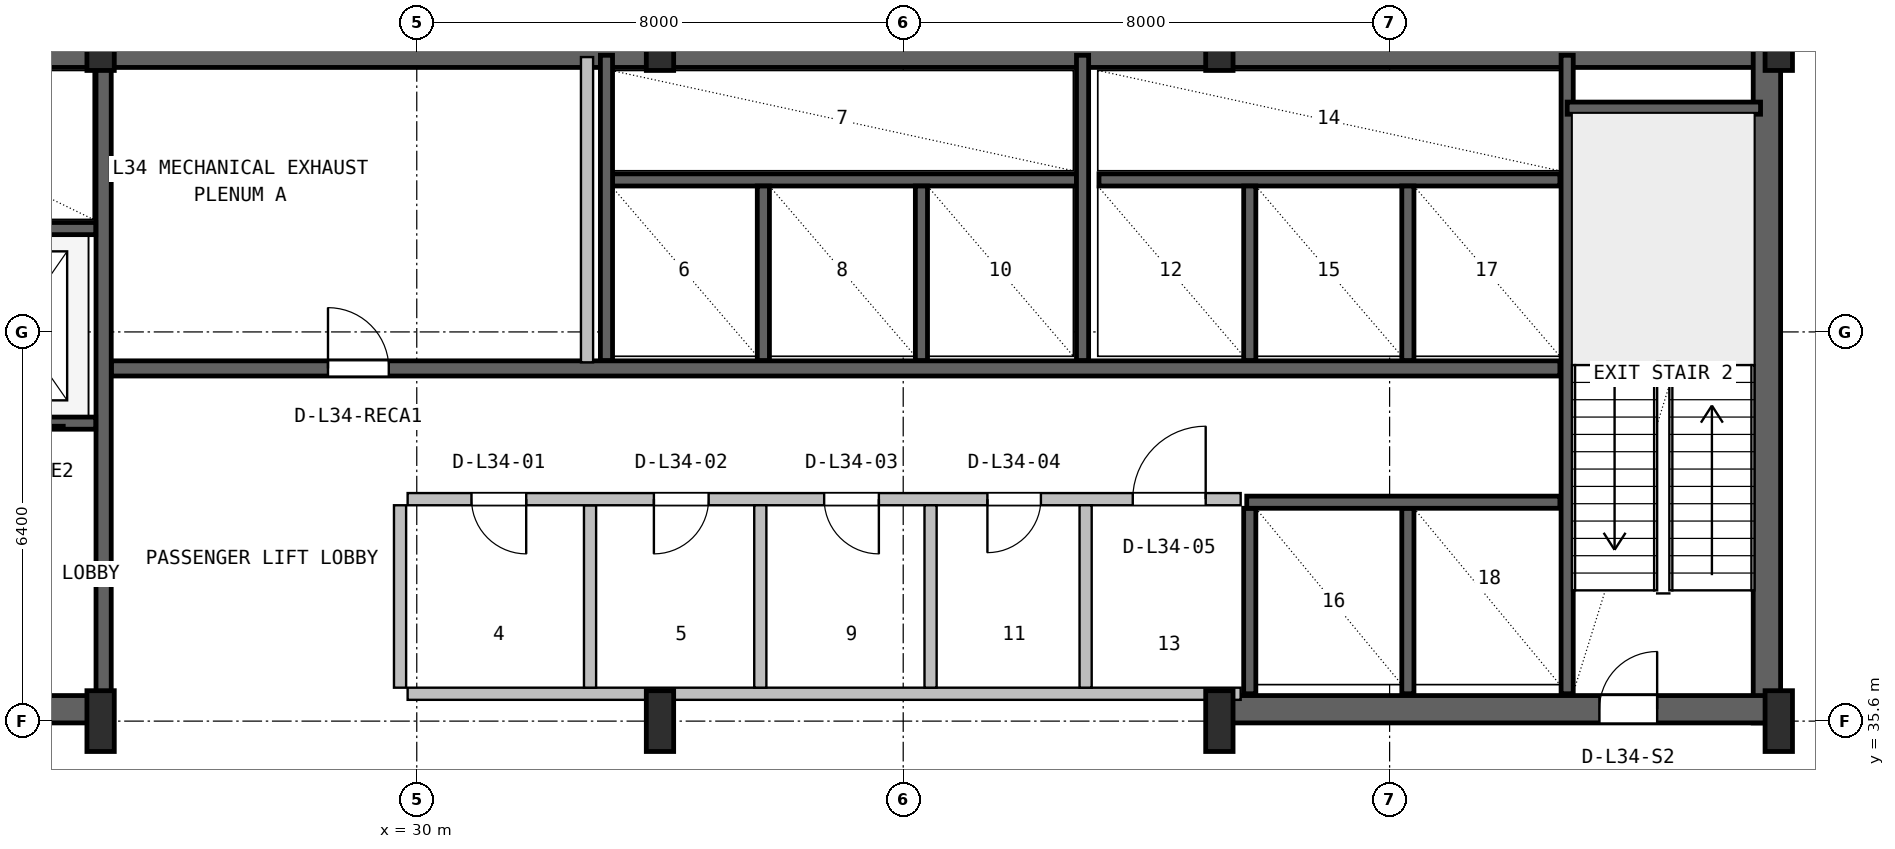
"""IFC4 building model, lengths in metres.
Left out: names, types, materials, properties, quantities, classifications, styles, units other than length and angle.
Written with IfcOpenShell. Run it as: python <this file> out.ifc"""

import sys

from ifc_helpers import new_model, si_unit, direction, frame, frame_2d, origin, origin_2d, place, context, subcontext, project, spatial, rectangle, i_section, extrude, source, transform, mapped, element, fill, save


model = new_model("IFC4")
c1 = context("Model", 3, precision=1e-05, world=origin(), true_north=direction((0.0, 1.0)))
c2 = subcontext(c1, "Body", "Model", "MODEL_VIEW")
j1 = project(units=[si_unit("LENGTHUNIT", "METRE"), si_unit("PLANEANGLEUNIT", "RADIAN")], contexts=[c1])
p1 = place(None, origin())
s1 = spatial("IfcSite", under=j1, at=p1, CompositionType="ELEMENT")
p2 = place(p1, origin())
s2 = spatial("IfcBuilding", under=s1, at=p2, CompositionType="ELEMENT")
p3 = place(p2, frame((0.0, 0.0, 141.0)))
s3 = spatial("IfcBuildingStorey", under=s2, at=p3, CompositionType="ELEMENT", Elevation=141.0)
p4 = place(p3, frame((15.6, 46.575, 0.0), z_axis=(0.0, 0.0, 1.0), x_axis=(1.0, 0.0, 0.0)))
e1 = element("IfcWall", 1, at=p4, inside=s3, PredefinedType="SHEAR", context=c2, shape_type="SweptSolid", body=[
    extrude(rectangle(XDim=36.8, YDim=0.45, at=frame_2d((18.4, 0.0))), origin(), (0.0, 0.0, 1.0), 4.55),
])
p5 = place(p3, frame((52.205, 35.57, 0.0), z_axis=(0.0, 0.0, 1.0), x_axis=(0.0, 1.0, 0.0)))
e2 = element("IfcWall", 2, at=p5, inside=s3, PredefinedType="SHEAR", context=c2, shape_type="SweptSolid", body=[
    extrude(rectangle(XDim=11.23, YDim=0.45, at=frame_2d((5.615, 0.0))), origin(), (0.0, 0.0, 1.0), 4.55),
])
p6 = place(p3, frame((15.57, 35.795, 0.0), z_axis=(0.0, 0.0, 1.0), x_axis=(1.0, 0.0, 0.0)))
e3 = element("IfcWall", 3, at=p6, inside=s3, PredefinedType="SHEAR", context=c2, shape_type="SweptSolid", body=[
    extrude(rectangle(XDim=9.23, YDim=0.45, at=frame_2d((4.615, 0.0))), origin(), (0.0, 0.0, 1.0), 4.55),
])
p7 = place(p6, frame((5.4, 0.0, 0.0)))
e4 = element("IfcOpeningElement", 4, at=p7, cuts=e3, PredefinedType="OPENING", context=c2, shape_type="SweptSolid", body=[
    extrude(rectangle(XDim=1.0, YDim=2.1, at=frame_2d((0.5, 1.05))), frame((0.0, 0.235, 0.0), z_axis=(0.0, -1.0, 0.0), x_axis=(1.0, 0.0, 0.0)), (0.0, 0.0, 1.0), 0.47),
])
p8 = place(p3, frame((43.2, 35.795, 0.0), z_axis=(0.0, 0.0, 1.0), x_axis=(1.0, 0.0, 0.0)))
e5 = element("IfcWall", 5, at=p8, inside=s3, PredefinedType="SHEAR", context=c2, shape_type="SweptSolid", body=[
    extrude(rectangle(XDim=9.23, YDim=0.45, at=frame_2d((4.615, 0.0))), origin(), (0.0, 0.0, 1.0), 4.55),
])
p9 = place(p8, frame((6.25, 0.0, 0.0)))
e6 = element("IfcOpeningElement", 6, at=p9, cuts=e5, PredefinedType="OPENING", context=c2, shape_type="SweptSolid", body=[
    extrude(rectangle(XDim=0.95, YDim=2.1, at=frame_2d((0.475, 1.05))), frame((0.0, 0.235, 0.0), z_axis=(0.0, -1.0, 0.0), x_axis=(1.0, 0.0, 0.0)), (0.0, 0.0, 1.0), 0.47),
])
m1 = source(origin(), c2, "Body", "SweptSolid", [
    extrude(i_section(OverallWidth=0.45, OverallDepth=1.0, WebThickness=0.016, FlangeThickness=0.03, FilletRadius=0.016, at=origin_2d()), origin(), (0.0, 0.0, 1.0), 4.8),
])
for number, where, z_axis, x_axis in (
    (7, (24.8, 35.6, 0.0), (0.0, 0.0, 1.0), (1.0, 0.0, 0.0)),
    (8, (24.8, 46.8, 0.0), (0.0, 0.0, 1.0), (1.0, 0.0, 0.0)),
    (9, (34.0, 35.6, 0.0), (0.0, 0.0, 1.0), (1.0, 0.0, 0.0)),
    (10, (34.0, 46.8, 0.0), (0.0, 0.0, 1.0), (1.0, 0.0, 0.0)),
    (11, (43.2, 35.6, 0.0), (0.0, 0.0, 1.0), (1.0, 0.0, 0.0)),
    (12, (43.2, 46.8, 0.0), (0.0, 0.0, 1.0), (1.0, 0.0, 0.0)),
    (13, (52.4, 35.6, 0.0), (0.0, 0.0, 1.0), (1.0, 0.0, 0.0)),
    (14, (52.4, 46.8, 0.0), (0.0, 0.0, 1.0), (1.0, 0.0, 0.0)),
):
    element("IfcColumn", number, at=place(p3, frame(where, z_axis=z_axis, x_axis=x_axis)), inside=s3, PredefinedType="COLUMN", context=c2, shape_type="MappedRepresentation", body=[
        mapped(m1, transform((0.0, 0.0, 0.0), x_axis=(1.0, 0.0, 0.0), y_axis=(0.0, 1.0, 0.0), z_axis=(0.0, 0.0, 1.0), scale=1.0)),
    ])
p10 = place(p3, frame((24.85, 36.05, 0.0), z_axis=(0.0, 0.0, 1.0), x_axis=(0.0, 1.0, 0.0)))
e15 = element("IfcWall", 15, at=p10, inside=s3, PredefinedType="SHEAR", context=c2, shape_type="SweptSolid", body=[
    extrude(rectangle(XDim=10.45, YDim=0.25, at=frame_2d((5.225, 0.0))), origin(), (0.0, 0.0, 1.0), 4.55),
])
p11 = place(p3, frame((19.2, 40.5, 0.0), z_axis=(0.0, 0.0, 1.0), x_axis=(1.0, 0.0, 0.0)))
e16 = element("IfcWall", 16, at=p11, inside=s3, PredefinedType="SHEAR", context=c2, shape_type="SweptSolid", body=[
    extrude(rectangle(XDim=5.52, YDim=0.2, at=frame_2d((2.76, 0.0))), origin(), (0.0, 0.0, 1.0), 4.55),
])
p12 = place(p11, frame((1.05, 0.0, 0.0)))
e17 = element("IfcOpeningElement", 17, at=p12, cuts=e16, PredefinedType="OPENING", context=c2, shape_type="SweptSolid", body=[
    extrude(rectangle(XDim=1.1, YDim=2.18, at=frame_2d((0.55, 1.09))), frame((0.0, 0.11, 0.0), z_axis=(0.0, -1.0, 0.0), x_axis=(1.0, 0.0, 0.0)), (0.0, 0.0, 1.0), 0.22),
])
p13 = place(p11, frame((3.65, 0.0, 0.0)))
e18 = element("IfcOpeningElement", 18, at=p13, cuts=e16, PredefinedType="OPENING", context=c2, shape_type="SweptSolid", body=[
    extrude(rectangle(XDim=1.1, YDim=2.18, at=frame_2d((0.55, 1.09))), frame((0.0, 0.11, 0.0), z_axis=(0.0, -1.0, 0.0), x_axis=(1.0, 0.0, 0.0)), (0.0, 0.0, 1.0), 0.22),
])
p14 = place(p3, frame((19.2, 43.7, 0.0), z_axis=(0.0, 0.0, 1.0), x_axis=(1.0, 0.0, 0.0)))
e19 = element("IfcWall", 19, at=p14, inside=s3, PredefinedType="SHEAR", context=c2, shape_type="SweptSolid", body=[
    extrude(rectangle(XDim=5.52, YDim=0.2, at=frame_2d((2.76, 0.0))), origin(), (0.0, 0.0, 1.0), 4.55),
])
p15 = place(p3, frame((48.92, 36.05, 0.0), z_axis=(0.0, 0.0, 1.0), x_axis=(0.0, 1.0, 0.0)))
e20 = element("IfcWall", 20, at=p15, inside=s3, PredefinedType="SHEAR", context=c2, shape_type="SweptSolid", body=[
    extrude(rectangle(XDim=10.5, YDim=0.2, at=frame_2d((5.25, 0.0))), origin(), (0.0, 0.0, 1.0), 4.55),
])
p16 = place(p3, frame((48.92, 45.68, 0.0), z_axis=(0.0, 0.0, 1.0), x_axis=(1.0, 0.0, 0.0)))
e21 = element("IfcWall", 21, at=p16, inside=s3, PredefinedType="SHEAR", context=c2, shape_type="SweptSolid", body=[
    extrude(rectangle(XDim=3.18, YDim=0.2, at=frame_2d((1.59, 0.0))), origin(), (0.0, 0.0, 1.0), 4.55),
])
p17 = place(p3, frame((24.98, 41.4, 0.0), z_axis=(0.0, 0.0, 1.0), x_axis=(1.0, 0.0, 0.0)))
e22 = element("IfcWall", 22, at=p17, inside=s3, PredefinedType="SHEAR", context=c2, shape_type="SweptSolid", body=[
    extrude(rectangle(XDim=23.82, YDim=0.25, at=frame_2d((11.91, 0.0))), origin(), (0.0, 0.0, 1.0), 4.55),
])
p18 = place(p17, frame((3.56, 0.0, 0.0)))
e23 = element("IfcOpeningElement", 23, at=p18, cuts=e22, PredefinedType="OPENING", context=c2, shape_type="SweptSolid", body=[
    extrude(rectangle(XDim=1.0, YDim=2.08, at=frame_2d((0.5, 1.04))), frame((0.0, 0.135, 0.0), z_axis=(0.0, -1.0, 0.0), x_axis=(1.0, 0.0, 0.0)), (0.0, 0.0, 1.0), 0.27),
])
p19 = place(p3, frame((33.22, 44.5, 0.0), z_axis=(0.0, 0.0, 1.0), x_axis=(1.0, 0.0, 0.0)))
e24 = element("IfcWall", 24, at=p19, inside=s3, PredefinedType="SHEAR", context=c2, shape_type="SweptSolid", body=[
    extrude(rectangle(XDim=7.63, YDim=0.2, at=frame_2d((3.815, 0.0))), origin(), (0.0, 0.0, 1.0), 4.55),
])
p20 = place(p3, frame((33.12, 41.53, 0.0), z_axis=(0.0, 0.0, 1.0), x_axis=(0.0, 1.0, 0.0)))
e25 = element("IfcWall", 25, at=p20, inside=s3, PredefinedType="SHEAR", context=c2, shape_type="SweptSolid", body=[
    extrude(rectangle(XDim=5.02, YDim=0.2, at=frame_2d((2.51, 0.0))), origin(), (0.0, 0.0, 1.0), 4.55),
])
for number, where, z_axis, x_axis in (
    (26, (35.7, 41.53, 0.0), (0.0, 0.0, 1.0), (0.0, 1.0, 0.0)),
    (27, (38.3, 41.53, 0.0), (0.0, 0.0, 1.0), (0.0, 1.0, 0.0)),
):
    element("IfcWall", number, at=place(p3, frame(where, z_axis=z_axis, x_axis=x_axis)), inside=s3, PredefinedType="SHEAR", context=c2, shape_type="SweptSolid", body=[
        extrude(rectangle(XDim=2.87, YDim=0.2, at=frame_2d((1.435, 0.0))), origin(), (0.0, 0.0, 1.0), 4.55),
    ])
p21 = place(p3, frame((40.95, 41.53, 0.0), z_axis=(0.0, 0.0, 1.0), x_axis=(0.0, 1.0, 0.0)))
e28 = element("IfcWall", 28, at=p21, inside=s3, PredefinedType="SHEAR", context=c2, shape_type="SweptSolid", body=[
    extrude(rectangle(XDim=5.02, YDim=0.2, at=frame_2d((2.51, 0.0))), origin(), (0.0, 0.0, 1.0), 4.55),
])
p22 = place(p3, frame((41.22, 44.5, 0.0), z_axis=(0.0, 0.0, 1.0), x_axis=(1.0, 0.0, 0.0)))
e29 = element("IfcWall", 29, at=p22, inside=s3, PredefinedType="SHEAR", context=c2, shape_type="SweptSolid", body=[
    extrude(rectangle(XDim=7.58, YDim=0.2, at=frame_2d((3.79, 0.0))), origin(), (0.0, 0.0, 1.0), 4.55),
])
for number, where, z_axis, x_axis in (
    (30, (43.7, 41.53, 0.0), (0.0, 0.0, 1.0), (0.0, 1.0, 0.0)),
    (31, (46.3, 41.53, 0.0), (0.0, 0.0, 1.0), (0.0, 1.0, 0.0)),
):
    element("IfcWall", number, at=place(p3, frame(where, z_axis=z_axis, x_axis=x_axis)), inside=s3, PredefinedType="SHEAR", context=c2, shape_type="SweptSolid", body=[
        extrude(rectangle(XDim=2.87, YDim=0.2, at=frame_2d((1.435, 0.0))), origin(), (0.0, 0.0, 1.0), 4.55),
    ])
for number, where, z_axis, x_axis in (
    (32, (43.7, 36.05, 0.0), (0.0, 0.0, 1.0), (0.0, 1.0, 0.0)),
    (33, (46.3, 36.05, 0.0), (0.0, 0.0, 1.0), (0.0, 1.0, 0.0)),
):
    element("IfcWall", number, at=place(p3, frame(where, z_axis=z_axis, x_axis=x_axis)), inside=s3, PredefinedType="SHEAR", context=c2, shape_type="SweptSolid", body=[
        extrude(rectangle(XDim=3.05, YDim=0.2, at=frame_2d((1.525, 0.0))), origin(), (0.0, 0.0, 1.0), 4.55),
    ])
p23 = place(p3, frame((43.65, 39.2, 0.0), z_axis=(0.0, 0.0, 1.0), x_axis=(1.0, 0.0, 0.0)))
e34 = element("IfcWall", 34, at=p23, inside=s3, PredefinedType="SHEAR", context=c2, shape_type="SweptSolid", body=[
    extrude(rectangle(XDim=5.15, YDim=0.2, at=frame_2d((2.575, 0.0))), origin(), (0.0, 0.0, 1.0), 4.55),
])
p24 = place(p3, frame((29.85, 36.05, 0.0), z_axis=(0.0, 0.0, 1.0), x_axis=(1.0, 0.0, 0.0)))
e35 = element("IfcWall", 35, at=p24, inside=s3, PredefinedType="SOLIDWALL", context=c2, shape_type="SweptSolid", body=[
    extrude(rectangle(XDim=13.7, YDim=0.2, at=frame_2d((6.85, 0.0))), origin(), (0.0, 0.0, 1.0), 4.53),
])
p25 = place(p3, frame((32.85, 36.15, 0.0), z_axis=(0.0, 0.0, 1.0), x_axis=(0.0, 1.0, 0.0)))
e36 = element("IfcWall", 36, at=p25, inside=s3, PredefinedType="SOLIDWALL", context=c2, shape_type="SweptSolid", body=[
    extrude(rectangle(XDim=3.0, YDim=0.2, at=frame_2d((1.5, 0.0))), origin(), (0.0, 0.0, 1.0), 4.53),
])
p26 = place(p3, frame((29.85, 39.25, 0.0), z_axis=(0.0, 0.0, 1.0), x_axis=(1.0, 0.0, 0.0)))
e37 = element("IfcWall", 37, at=p26, inside=s3, PredefinedType="SOLIDWALL", context=c2, shape_type="SweptSolid", body=[
    extrude(rectangle(XDim=13.7, YDim=0.2, at=frame_2d((6.85, 0.0))), origin(), (0.0, 0.0, 1.0), 4.53),
])
p27 = place(p26, frame((1.05, 0.0, 0.0)))
e38 = element("IfcOpeningElement", 38, at=p27, cuts=e37, PredefinedType="OPENING", context=c2, shape_type="SweptSolid", body=[
    extrude(rectangle(XDim=0.9, YDim=2.06, at=frame_2d((0.45, 1.03))), frame((0.0, 0.11, 0.0), z_axis=(0.0, -1.0, 0.0), x_axis=(1.0, 0.0, 0.0)), (0.0, 0.0, 1.0), 0.22),
])
p28 = place(p26, frame((4.05, 0.0, 0.0)))
e39 = element("IfcOpeningElement", 39, at=p28, cuts=e37, PredefinedType="OPENING", context=c2, shape_type="SweptSolid", body=[
    extrude(rectangle(XDim=0.9, YDim=2.06, at=frame_2d((0.45, 1.03))), frame((0.0, 0.11, 0.0), z_axis=(0.0, -1.0, 0.0), x_axis=(1.0, 0.0, 0.0)), (0.0, 0.0, 1.0), 0.22),
])
p29 = place(p26, frame((6.85, 0.0, 0.0)))
e40 = element("IfcOpeningElement", 40, at=p29, cuts=e37, PredefinedType="OPENING", context=c2, shape_type="SweptSolid", body=[
    extrude(rectangle(XDim=0.9, YDim=2.06, at=frame_2d((0.45, 1.03))), frame((0.0, 0.11, 0.0), z_axis=(0.0, -1.0, 0.0), x_axis=(1.0, 0.0, 0.0)), (0.0, 0.0, 1.0), 0.22),
])
p30 = place(p26, frame((9.535, 0.0, 0.0)))
e41 = element("IfcOpeningElement", 41, at=p30, cuts=e37, PredefinedType="OPENING", context=c2, shape_type="SweptSolid", body=[
    extrude(rectangle(XDim=0.88, YDim=2.06, at=frame_2d((0.44, 1.03))), frame((0.0, 0.11, 0.0), z_axis=(0.0, -1.0, 0.0), x_axis=(1.0, 0.0, 0.0)), (0.0, 0.0, 1.0), 0.22),
])
p31 = place(p26, frame((11.925, 0.0, 0.0)))
e42 = element("IfcOpeningElement", 42, at=p31, cuts=e37, PredefinedType="OPENING", context=c2, shape_type="SweptSolid", body=[
    extrude(rectangle(XDim=1.2, YDim=2.1, at=frame_2d((0.6, 1.05))), frame((0.0, 0.11, 0.0), z_axis=(0.0, -1.0, 0.0), x_axis=(1.0, 0.0, 0.0)), (0.0, 0.0, 1.0), 0.22),
])
for number, where, z_axis, x_axis in (
    (43, (29.725, 36.15, 0.0), (0.0, 0.0, 1.0), (0.0, 1.0, 0.0)),
    (44, (35.65, 36.15, 0.0), (0.0, 0.0, 1.0), (0.0, 1.0, 0.0)),
    (45, (38.45, 36.15, 0.0), (0.0, 0.0, 1.0), (0.0, 1.0, 0.0)),
    (46, (41.0, 36.15, 0.0), (0.0, 0.0, 1.0), (0.0, 1.0, 0.0)),
):
    element("IfcWall", number, at=place(p3, frame(where, z_axis=z_axis, x_axis=x_axis)), inside=s3, PredefinedType="SOLIDWALL", context=c2, shape_type="SweptSolid", body=[
        extrude(rectangle(XDim=3.0, YDim=0.2, at=frame_2d((1.5, 0.0))), origin(), (0.0, 0.0, 1.0), 4.53),
    ])
p32 = place(p3, frame((32.8, 41.5, 0.0), z_axis=(0.0, 0.0, 1.0), x_axis=(0.0, 1.0, 0.0)))
e47 = element("IfcWall", 47, at=p32, inside=s3, PredefinedType="SOLIDWALL", context=c2, shape_type="SweptSolid", body=[
    extrude(rectangle(XDim=5.02, YDim=0.2, at=frame_2d((2.51, 0.0))), origin(), (0.0, 0.0, 1.0), 4.53),
])
m2 = source(origin(), c2, "Body", "SweptSolid", [
    extrude(rectangle(XDim=0.95, YDim=2.1, at=frame_2d((0.475, 1.05))), frame((0.0, 0.025, 0.0), z_axis=(0.0, -1.0, 0.0), x_axis=(1.0, 0.0, 0.0)), (0.0, 0.0, 1.0), 0.05),
])
p33 = place(p9, origin())
e48 = element("IfcDoor", 48, at=p33, inside=s3, OperationType="SINGLE_SWING_RIGHT", PredefinedType="DOOR", context=c2, shape_type="MappedRepresentation", body=[
    mapped(m2, transform((0.0, 0.0, 0.0), x_axis=(1.0, 0.0, 0.0), y_axis=(0.0, 1.0, 0.0), z_axis=(0.0, 0.0, 1.0), scale=1.0)),
])
fill(e6, e48)
m3 = source(origin(), c2, "Body", "SweptSolid", [
    extrude(rectangle(XDim=1.0, YDim=2.08, at=frame_2d((0.5, 1.04))), frame((0.0, 0.025, 0.0), z_axis=(0.0, -1.0, 0.0), x_axis=(1.0, 0.0, 0.0)), (0.0, 0.0, 1.0), 0.05),
])
p34 = place(p18, origin())
e49 = element("IfcDoor", 49, at=p34, inside=s3, OperationType="SINGLE_SWING_LEFT", PredefinedType="DOOR", context=c2, shape_type="MappedRepresentation", body=[
    mapped(m3, transform((0.0, 0.0, 0.0), x_axis=(1.0, 0.0, 0.0), y_axis=(0.0, 1.0, 0.0), z_axis=(0.0, 0.0, 1.0), scale=1.0)),
])
fill(e23, e49)
m4 = source(origin(), c2, "Body", "SweptSolid", [
    extrude(rectangle(XDim=0.9, YDim=2.06, at=frame_2d((0.45, 1.03))), frame((0.0, 0.025, 0.0), z_axis=(0.0, -1.0, 0.0), x_axis=(1.0, 0.0, 0.0)), (0.0, 0.0, 1.0), 0.05),
])
p35 = place(p27, frame((0.9, 0.0, 0.0), z_axis=(0.0, 0.0, 1.0), x_axis=(-1.0, 0.0, 0.0)))
e50 = element("IfcDoor", 50, at=p35, inside=s3, OperationType="SINGLE_SWING_RIGHT", PredefinedType="DOOR", context=c2, shape_type="MappedRepresentation", body=[
    mapped(m4, transform((0.0, 0.0, 0.0), x_axis=(1.0, 0.0, 0.0), y_axis=(0.0, 1.0, 0.0), z_axis=(0.0, 0.0, 1.0), scale=1.0)),
])
fill(e38, e50)
p36 = place(p28, frame((0.9, 0.0, 0.0), z_axis=(0.0, 0.0, 1.0), x_axis=(-1.0, 0.0, 0.0)))
e51 = element("IfcDoor", 51, at=p36, inside=s3, OperationType="SINGLE_SWING_LEFT", PredefinedType="DOOR", context=c2, shape_type="MappedRepresentation", body=[
    mapped(m4, transform((0.0, 0.0, 0.0), x_axis=(1.0, 0.0, 0.0), y_axis=(0.0, 1.0, 0.0), z_axis=(0.0, 0.0, 1.0), scale=1.0)),
])
fill(e39, e51)
p37 = place(p29, frame((0.9, 0.0, 0.0), z_axis=(0.0, 0.0, 1.0), x_axis=(-1.0, 0.0, 0.0)))
e52 = element("IfcDoor", 52, at=p37, inside=s3, OperationType="SINGLE_SWING_RIGHT", PredefinedType="DOOR", context=c2, shape_type="MappedRepresentation", body=[
    mapped(m4, transform((0.0, 0.0, 0.0), x_axis=(1.0, 0.0, 0.0), y_axis=(0.0, 1.0, 0.0), z_axis=(0.0, 0.0, 1.0), scale=1.0)),
])
fill(e40, e52)
m5 = source(origin(), c2, "Body", "SweptSolid", [
    extrude(rectangle(XDim=0.88, YDim=2.06, at=frame_2d((0.44, 1.03))), frame((0.0, 0.025, 0.0), z_axis=(0.0, -1.0, 0.0), x_axis=(1.0, 0.0, 0.0)), (0.0, 0.0, 1.0), 0.05),
])
p38 = place(p30, frame((0.88, 0.0, 0.0), z_axis=(0.0, 0.0, 1.0), x_axis=(-1.0, 0.0, 0.0)))
e53 = element("IfcDoor", 53, at=p38, inside=s3, OperationType="SINGLE_SWING_LEFT", PredefinedType="DOOR", context=c2, shape_type="MappedRepresentation", body=[
    mapped(m5, transform((0.0, 0.0, 0.0), x_axis=(1.0, 0.0, 0.0), y_axis=(0.0, 1.0, 0.0), z_axis=(0.0, 0.0, 1.0), scale=1.0)),
])
fill(e41, e53)
m6 = source(origin(), c2, "Body", "SweptSolid", [
    extrude(rectangle(XDim=1.2, YDim=2.1, at=frame_2d((0.6, 1.05))), frame((0.0, 0.025, 0.0), z_axis=(0.0, -1.0, 0.0), x_axis=(1.0, 0.0, 0.0)), (0.0, 0.0, 1.0), 0.05),
])
p39 = place(p31, origin())
e54 = element("IfcDoor", 54, at=p39, inside=s3, OperationType="SINGLE_SWING_RIGHT", PredefinedType="DOOR", context=c2, shape_type="MappedRepresentation", body=[
    mapped(m6, transform((0.0, 0.0, 0.0), x_axis=(1.0, 0.0, 0.0), y_axis=(0.0, 1.0, 0.0), z_axis=(0.0, 0.0, 1.0), scale=1.0)),
])
fill(e42, e54)
save(model, sys.argv[1])
